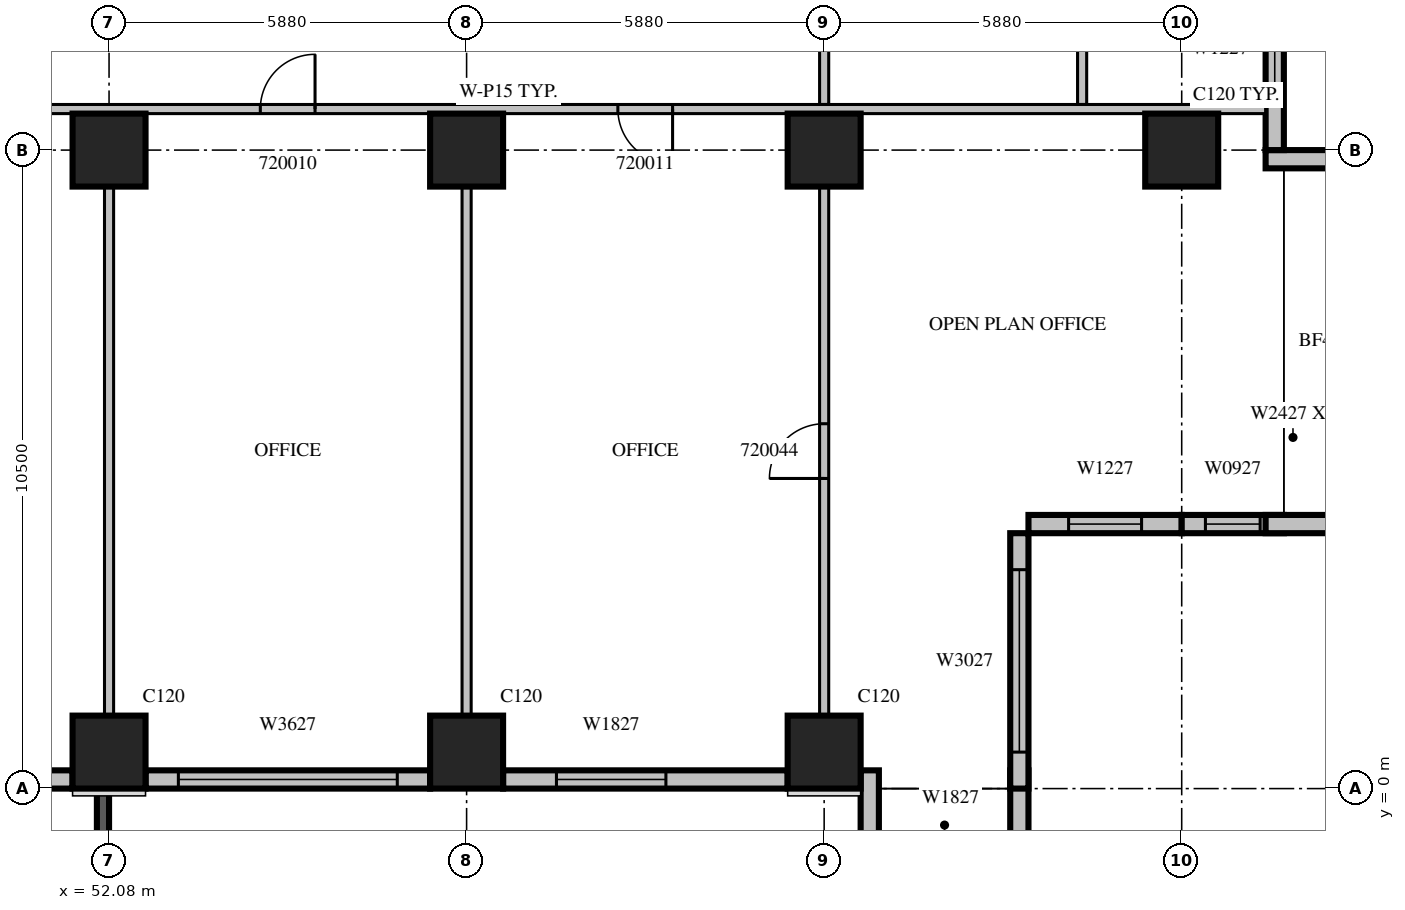
"""IFC4 building model, lengths in metres.
Left out: names, types, materials, properties, quantities, classifications, styles, units other than length and angle.
Written with IfcOpenShell. Run it as: python <this file> out.ifc"""

import sys

from ifc_helpers import new_model, si_unit, direction, frame, frame_2d, origin, origin_2d, place, context, subcontext, project, spatial, rectangle, extrude, source, transform, mapped, element, fill, save


model = new_model("IFC4")
c1 = context("Model", 3, precision=1e-05, world=origin(), true_north=direction((0.0, 1.0)))
c2 = subcontext(c1, "Body", "Model", "MODEL_VIEW")
j1 = project(units=[si_unit("LENGTHUNIT", "METRE"), si_unit("PLANEANGLEUNIT", "RADIAN")], contexts=[c1])
p1 = place(None, origin())
s1 = spatial("IfcSite", under=j1, at=p1, CompositionType="ELEMENT")
p2 = place(p1, origin())
s2 = spatial("IfcBuilding", under=s1, at=p2, CompositionType="ELEMENT")
p3 = place(p2, frame((0.0, 0.0, 95.1)))
s3 = spatial("IfcBuildingStorey", under=s2, at=p3, CompositionType="ELEMENT", Elevation=95.1)
m1 = source(origin(), c2, "Body", "SweptSolid", [
    extrude(rectangle(XDim=1.2, YDim=1.2, at=origin_2d()), origin(), (0.0, 0.0, 1.0), 4.2),
])
for number, where, z_axis, x_axis in (
    (1, (52.08, 0.6, 0.0), (0.0, 0.0, 1.0), (1.0, 0.0, 0.0)),
    (2, (57.96, 0.6, 0.0), (0.0, 0.0, 1.0), (1.0, 0.0, 0.0)),
    (3, (63.84, 0.6, 0.0), (0.0, 0.0, 1.0), (1.0, 0.0, 0.0)),
    (4, (52.08, 10.5, 0.0), (0.0, 0.0, 1.0), (1.0, 0.0, 0.0)),
    (5, (57.96, 10.5, 0.0), (0.0, 0.0, 1.0), (1.0, 0.0, 0.0)),
    (6, (63.84, 10.5, 0.0), (0.0, 0.0, 1.0), (1.0, 0.0, 0.0)),
    (7, (69.72, 10.5, 0.0), (0.0, 0.0, 1.0), (1.0, 0.0, 0.0)),
):
    element("IfcColumn", number, at=place(p3, frame(where, z_axis=z_axis, x_axis=x_axis)), inside=s3, PredefinedType="COLUMN", context=c2, shape_type="MappedRepresentation", body=[
        mapped(m1, transform((0.0, 0.0, 0.0), scale=1.0)),
    ])
m2 = source(origin(), c2, "Body", "SweptSolid", [
    extrude(rectangle(XDim=4.68, YDim=0.3, at=frame_2d((2.34, 0.0))), origin(), (0.0, 0.0, 1.0), 3.8),
])
p4 = place(p3, frame((46.8, 0.15, 0.0), z_axis=(0.0, 0.0, 1.0), x_axis=(1.0, 0.0, 0.0)))
e8 = element("IfcWall", 8, at=p4, inside=s3, PredefinedType="STANDARD", context=c2, shape_type="MappedRepresentation", body=[
    mapped(m2, transform((0.0, 0.0, 0.0), scale=1.0)),
])
m3 = source(origin(), c2, "Body", "SweptSolid", [
    extrude(rectangle(XDim=1.0, YDim=2.1, at=frame_2d((0.5, 1.05))), frame((0.0, 0.16, 0.0), z_axis=(0.0, -1.0, 0.0), x_axis=(1.0, 0.0, 0.0)), (0.0, 0.0, 1.0), 0.32),
])
p5 = place(p4, frame((1.84, 0.0, 0.0)))
e9 = element("IfcOpeningElement", 9, at=p5, cuts=e8, PredefinedType="OPENING", context=c2, shape_type="MappedRepresentation", body=[
    mapped(m3, transform((0.0, 0.0, 0.0), scale=1.0)),
])
p6 = place(p3, frame((52.68, 0.15, 0.0), z_axis=(0.0, 0.0, 1.0), x_axis=(1.0, 0.0, 0.0)))
e10 = element("IfcWall", 10, at=p6, inside=s3, PredefinedType="STANDARD", context=c2, shape_type="MappedRepresentation", body=[
    mapped(m2, transform((0.0, 0.0, 0.0), scale=1.0)),
])
m4 = source(origin(), c2, "Body", "SweptSolid", [
    extrude(rectangle(XDim=3.6, YDim=2.7, at=frame_2d((1.8, 1.35))), frame((0.0, 0.16, 0.0), z_axis=(0.0, -1.0, 0.0), x_axis=(1.0, 0.0, 0.0)), (0.0, 0.0, 1.0), 0.32),
])
p7 = place(p6, frame((0.54, 0.0, 0.6)))
e11 = element("IfcOpeningElement", 11, at=p7, cuts=e10, PredefinedType="OPENING", context=c2, shape_type="MappedRepresentation", body=[
    mapped(m4, transform((0.0, 0.0, 0.0), scale=1.0)),
])
p8 = place(p3, frame((58.56, 0.15, 0.0), z_axis=(0.0, 0.0, 1.0), x_axis=(1.0, 0.0, 0.0)))
e12 = element("IfcWall", 12, at=p8, inside=s3, PredefinedType="STANDARD", context=c2, shape_type="MappedRepresentation", body=[
    mapped(m2, transform((0.0, 0.0, 0.0), scale=1.0)),
])
m5 = source(origin(), c2, "Body", "SweptSolid", [
    extrude(rectangle(XDim=1.8, YDim=2.7, at=frame_2d((0.9, 1.35))), frame((0.0, 0.16, 0.0), z_axis=(0.0, -1.0, 0.0), x_axis=(1.0, 0.0, 0.0)), (0.0, 0.0, 1.0), 0.32),
])
p9 = place(p8, frame((0.877, 0.0, 0.6)))
e13 = element("IfcOpeningElement", 13, at=p9, cuts=e12, PredefinedType="OPENING", context=c2, shape_type="MappedRepresentation", body=[
    mapped(m5, transform((0.0, 0.0, 0.0), scale=1.0)),
])
m6 = source(origin(), c2, "Body", "SweptSolid", [
    extrude(rectangle(XDim=1.2, YDim=0.3, at=frame_2d((0.6, 0.0))), origin(), (0.0, 0.0, 1.0), 3.8),
])
for number, where, z_axis, x_axis in (
    (14, (64.59, 0.3, 0.0), (0.0, 0.0, 1.0), (0.0, -1.0, 0.0)),
    (15, (67.05, 0.3, 0.0), (0.0, 0.0, 1.0), (0.0, -1.0, 0.0)),
):
    element("IfcWall", number, at=place(p3, frame(where, z_axis=z_axis, x_axis=x_axis)), inside=s3, PredefinedType="STANDARD", context=c2, shape_type="MappedRepresentation", body=[
        mapped(m6, transform((0.0, 0.0, 0.0), scale=1.0)),
    ])
m7 = source(origin(), c2, "Body", "SweptSolid", [
    extrude(rectangle(XDim=4.2, YDim=0.3, at=frame_2d((2.1, 0.0))), origin(), (0.0, 0.0, 1.0), 3.8),
])
p10 = place(p3, frame((67.05, 0.0, 0.0), z_axis=(0.0, 0.0, 1.0), x_axis=(0.0, 1.0, 0.0)))
e16 = element("IfcWall", 16, at=p10, inside=s3, PredefinedType="STANDARD", context=c2, shape_type="MappedRepresentation", body=[
    mapped(m7, transform((0.0, 0.0, 0.0), scale=1.0)),
])
m8 = source(origin(), c2, "Body", "SweptSolid", [
    extrude(rectangle(XDim=3.0, YDim=2.7, at=frame_2d((1.5, 1.35))), frame((0.0, 0.16, 0.0), z_axis=(0.0, -1.0, 0.0), x_axis=(1.0, 0.0, 0.0)), (0.0, 0.0, 1.0), 0.32),
])
p11 = place(p10, frame((0.6, 0.0, 0.6)))
e17 = element("IfcOpeningElement", 17, at=p11, cuts=e16, PredefinedType="OPENING", context=c2, shape_type="MappedRepresentation", body=[
    mapped(m8, transform((0.0, 0.0, 0.0), scale=1.0)),
])
m9 = source(origin(), c2, "Body", "SweptSolid", [
    extrude(rectangle(XDim=2.52, YDim=0.3, at=frame_2d((1.26, 0.0))), origin(), (0.0, 0.0, 1.0), 3.8),
])
p12 = place(p3, frame((67.2, 4.35, 0.0), z_axis=(0.0, 0.0, 1.0), x_axis=(1.0, 0.0, 0.0)))
e18 = element("IfcWall", 18, at=p12, inside=s3, PredefinedType="STANDARD", context=c2, shape_type="MappedRepresentation", body=[
    mapped(m9, transform((0.0, 0.0, 0.0), scale=1.0)),
])
m10 = source(origin(), c2, "Body", "SweptSolid", [
    extrude(rectangle(XDim=1.2, YDim=2.7, at=frame_2d((0.6, 1.35))), frame((0.0, 0.16, 0.0), z_axis=(0.0, -1.0, 0.0), x_axis=(1.0, 0.0, 0.0)), (0.0, 0.0, 1.0), 0.32),
])
p13 = place(p12, frame((0.66, 0.0, 0.6)))
e19 = element("IfcOpeningElement", 19, at=p13, cuts=e18, PredefinedType="OPENING", context=c2, shape_type="MappedRepresentation", body=[
    mapped(m10, transform((0.0, 0.0, 0.0), scale=1.0)),
])
m11 = source(origin(), c2, "Body", "SweptSolid", [
    extrude(rectangle(XDim=1.68, YDim=0.3, at=frame_2d((0.84, 0.0))), origin(), (0.0, 0.0, 1.0), 3.8),
])
p14 = place(p3, frame((69.72, 4.35, 0.0), z_axis=(0.0, 0.0, 1.0), x_axis=(1.0, 0.0, 0.0)))
e20 = element("IfcWall", 20, at=p14, inside=s3, PredefinedType="STANDARD", context=c2, shape_type="MappedRepresentation", body=[
    mapped(m11, transform((0.0, 0.0, 0.0), scale=1.0)),
])
m12 = source(origin(), c2, "Body", "SweptSolid", [
    extrude(rectangle(XDim=0.9, YDim=2.7, at=frame_2d((0.45, 1.35))), frame((0.0, 0.16, 0.0), z_axis=(0.0, -1.0, 0.0), x_axis=(1.0, 0.0, 0.0)), (0.0, 0.0, 1.0), 0.32),
])
p15 = place(p14, frame((0.39, 0.0, 0.6)))
e21 = element("IfcOpeningElement", 21, at=p15, cuts=e20, PredefinedType="OPENING", context=c2, shape_type="MappedRepresentation", body=[
    mapped(m12, transform((0.0, 0.0, 0.0), scale=1.0)),
])
for number, where, z_axis, x_axis in (
    (22, (71.1, 4.35, 0.0), (0.0, 0.0, 1.0), (1.0, 0.0, 0.0)),
    (23, (71.1, 10.35, 0.0), (0.0, 0.0, 1.0), (1.0, 0.0, 0.0)),
):
    element("IfcWall", number, at=place(p3, frame(where, z_axis=z_axis, x_axis=x_axis)), inside=s3, PredefinedType="STANDARD", context=c2, shape_type="MappedRepresentation", body=[
        mapped(m6, transform((0.0, 0.0, 0.0), scale=1.0)),
    ])
m13 = source(origin(), c2, "Body", "SweptSolid", [
    extrude(rectangle(XDim=6.3, YDim=0.3, at=frame_2d((3.15, 0.0))), origin(), (0.0, 0.0, 1.0), 3.8),
])
p16 = place(p3, frame((71.25, 10.5, 0.0), z_axis=(0.0, 0.0, 1.0), x_axis=(0.0, 1.0, 0.0)))
e24 = element("IfcWall", 24, at=p16, inside=s3, PredefinedType="STANDARD", context=c2, shape_type="MappedRepresentation", body=[
    mapped(m13, transform((0.0, 0.0, 0.0), scale=1.0)),
])
p17 = place(p16, frame((1.062, 0.0, 0.6)))
e25 = element("IfcOpeningElement", 25, at=p17, cuts=e24, PredefinedType="OPENING", context=c2, shape_type="MappedRepresentation", body=[
    mapped(m10, transform((0.0, 0.0, 0.0), scale=1.0)),
])
m14 = source(origin(), c2, "Body", "SweptSolid", [
    extrude(rectangle(XDim=3.9, YDim=0.2, at=frame_2d((1.95, 0.0))), origin(), (0.0, 0.0, 1.0), 3.79),
])
p18 = place(p3, frame((51.98, 0.0, 0.0), z_axis=(0.0, 0.0, 1.0), x_axis=(0.0, -1.0, 0.0)))
e26 = element("IfcWall", 26, at=p18, inside=s3, PredefinedType="SOLIDWALL", context=c2, shape_type="MappedRepresentation", body=[
    mapped(m14, transform((0.0, 0.0, 0.0), scale=1.0)),
])
m15 = source(origin(), c2, "Body", "SweptSolid", [
    extrude(rectangle(XDim=2.4, YDim=2.7, at=frame_2d((1.2, 1.35))), frame((0.0, 0.11, 0.0), z_axis=(0.0, -1.0, 0.0), x_axis=(1.0, 0.0, 0.0)), (0.0, 0.0, 1.0), 0.22),
])
p19 = place(p18, frame((0.75, 0.0, 0.6)))
e27 = element("IfcOpeningElement", 27, at=p19, cuts=e26, PredefinedType="OPENING", context=c2, shape_type="MappedRepresentation", body=[
    mapped(m15, transform((0.0, 0.0, 0.0), scale=1.0)),
])
m16 = source(origin(), c2, "Body", "SweptSolid", [
    extrude(rectangle(XDim=8.702, YDim=0.15, at=frame_2d((4.351, 0.0))), origin(), (0.0, 0.0, 1.0), 3.8),
])
for number, where, z_axis, x_axis in (
    (28, (52.08, 1.199, 0.0), (0.0, 0.0, 1.0), (0.0, 1.0, 0.0)),
    (29, (57.96, 1.199, 0.0), (0.0, 0.0, 1.0), (0.0, 1.0, 0.0)),
):
    element("IfcWall", number, at=place(p3, frame(where, z_axis=z_axis, x_axis=x_axis)), inside=s3, PredefinedType="PARTITIONING", context=c2, shape_type="MappedRepresentation", body=[
        mapped(m16, transform((0.0, 0.0, 0.0), scale=1.0)),
    ])
m17 = source(origin(), c2, "Body", "SweptSolid", [
    extrude(rectangle(XDim=3.75, YDim=0.15, at=frame_2d((1.875, 0.0))), origin(), (0.0, 0.0, 1.0), 3.8),
])
p20 = place(p3, frame((68.082, 11.25, 0.0), z_axis=(0.0, 0.0, 1.0), x_axis=(0.0, 1.0, 0.0)))
e30 = element("IfcWall", 30, at=p20, inside=s3, PredefinedType="PARTITIONING", context=c2, shape_type="MappedRepresentation", body=[
    mapped(m17, transform((0.0, 0.0, 0.0), scale=1.0)),
])
p21 = place(p3, frame((63.84, 1.199, 0.0), z_axis=(0.0, 0.0, 1.0), x_axis=(0.0, 1.0, 0.0)))
e31 = element("IfcWall", 31, at=p21, inside=s3, PredefinedType="PARTITIONING", context=c2, shape_type="MappedRepresentation", body=[
    mapped(m16, transform((0.0, 0.0, 0.0), scale=1.0)),
])
m18 = source(origin(), c2, "Body", "SweptSolid", [
    extrude(rectangle(XDim=0.9, YDim=2.1, at=frame_2d((0.45, 1.05))), frame((0.0, 0.085, 0.0), z_axis=(0.0, -1.0, 0.0), x_axis=(1.0, 0.0, 0.0)), (0.0, 0.0, 1.0), 0.17),
])
p22 = place(p21, frame((3.901, 0.0, 0.0)))
e32 = element("IfcOpeningElement", 32, at=p22, cuts=e31, PredefinedType="OPENING", context=c2, shape_type="MappedRepresentation", body=[
    mapped(m18, transform((0.0, 0.0, 0.0), scale=1.0)),
])
p23 = place(p3, frame((63.84, 11.25, 0.0), z_axis=(0.0, 0.0, 1.0), x_axis=(0.0, 1.0, 0.0)))
e33 = element("IfcWall", 33, at=p23, inside=s3, PredefinedType="PARTITIONING", context=c2, shape_type="MappedRepresentation", body=[
    mapped(m17, transform((0.0, 0.0, 0.0), scale=1.0)),
])
m19 = source(origin(), c2, "Body", "SweptSolid", [
    extrude(rectangle(XDim=24.9, YDim=0.15, at=frame_2d((12.45, 0.0))), origin(), (0.0, 0.0, 1.0), 3.8),
])
p24 = place(p3, frame((71.1, 11.175, 0.0), z_axis=(0.0, 0.0, 1.0), x_axis=(-1.0, 0.0, 0.0)))
e34 = element("IfcWall", 34, at=p24, inside=s3, PredefinedType="PARTITIONING", context=c2, shape_type="MappedRepresentation", body=[
    mapped(m19, transform((0.0, 0.0, 0.0), scale=1.0)),
])
p25 = place(p24, frame((21.512, 0.0, 0.0)))
e35 = element("IfcOpeningElement", 35, at=p25, cuts=e34, PredefinedType="OPENING", context=c2, shape_type="MappedRepresentation", body=[
    mapped(m18, transform((0.0, 0.0, 0.0), scale=1.0)),
])
p26 = place(p24, frame((15.633, 0.0, 0.0)))
e36 = element("IfcOpeningElement", 36, at=p26, cuts=e34, PredefinedType="OPENING", context=c2, shape_type="MappedRepresentation", body=[
    mapped(m18, transform((0.0, 0.0, 0.0), scale=1.0)),
])
p27 = place(p24, frame((9.752, 0.0, 0.0)))
e37 = element("IfcOpeningElement", 37, at=p27, cuts=e34, PredefinedType="OPENING", context=c2, shape_type="MappedRepresentation", body=[
    mapped(m18, transform((0.0, 0.0, 0.0), scale=1.0)),
])
m20 = source(origin(), c2, "Body", "SweptSolid", [
    extrude(rectangle(XDim=3.6, YDim=2.7, at=frame_2d((1.8, 1.35))), frame((0.0, 0.03, 0.0), z_axis=(0.0, -1.0, 0.0), x_axis=(1.0, 0.0, 0.0)), (0.0, 0.0, 1.0), 0.06),
])
p28 = place(p7, origin())
e38 = element("IfcWindow", 38, at=p28, inside=s3, PartitioningType="SINGLE_PANEL", PredefinedType="WINDOW", context=c2, shape_type="MappedRepresentation", body=[
    mapped(m20, transform((0.0, 0.0, 0.0), scale=1.0)),
])
fill(e11, e38)
m21 = source(origin(), c2, "Body", "SweptSolid", [
    extrude(rectangle(XDim=1.8, YDim=2.7, at=frame_2d((0.9, 1.35))), frame((0.0, 0.03, 0.0), z_axis=(0.0, -1.0, 0.0), x_axis=(1.0, 0.0, 0.0)), (0.0, 0.0, 1.0), 0.06),
])
p29 = place(p9, origin())
e39 = element("IfcWindow", 39, at=p29, inside=s3, PartitioningType="SINGLE_PANEL", PredefinedType="WINDOW", context=c2, shape_type="MappedRepresentation", body=[
    mapped(m21, transform((0.0, 0.0, 0.0), scale=1.0)),
])
fill(e13, e39)
m22 = source(origin(), c2, "Body", "SweptSolid", [
    extrude(rectangle(XDim=3.0, YDim=2.7, at=frame_2d((1.5, 1.35))), frame((0.0, 0.03, 0.0), z_axis=(0.0, -1.0, 0.0), x_axis=(1.0, 0.0, 0.0)), (0.0, 0.0, 1.0), 0.06),
])
p30 = place(p11, origin())
e40 = element("IfcWindow", 40, at=p30, inside=s3, PartitioningType="SINGLE_PANEL", PredefinedType="WINDOW", context=c2, shape_type="MappedRepresentation", body=[
    mapped(m22, transform((0.0, 0.0, 0.0), scale=1.0)),
])
fill(e17, e40)
m23 = source(origin(), c2, "Body", "SweptSolid", [
    extrude(rectangle(XDim=1.2, YDim=2.7, at=frame_2d((0.6, 1.35))), frame((0.0, 0.03, 0.0), z_axis=(0.0, -1.0, 0.0), x_axis=(1.0, 0.0, 0.0)), (0.0, 0.0, 1.0), 0.06),
])
p31 = place(p13, origin())
e41 = element("IfcWindow", 41, at=p31, inside=s3, PartitioningType="SINGLE_PANEL", PredefinedType="WINDOW", context=c2, shape_type="MappedRepresentation", body=[
    mapped(m23, transform((0.0, 0.0, 0.0), scale=1.0)),
])
fill(e19, e41)
m24 = source(origin(), c2, "Body", "SweptSolid", [
    extrude(rectangle(XDim=0.9, YDim=2.7, at=frame_2d((0.45, 1.35))), frame((0.0, 0.03, 0.0), z_axis=(0.0, -1.0, 0.0), x_axis=(1.0, 0.0, 0.0)), (0.0, 0.0, 1.0), 0.06),
])
p32 = place(p15, origin())
e42 = element("IfcWindow", 42, at=p32, inside=s3, PartitioningType="SINGLE_PANEL", PredefinedType="WINDOW", context=c2, shape_type="MappedRepresentation", body=[
    mapped(m24, transform((0.0, 0.0, 0.0), scale=1.0)),
])
fill(e21, e42)
p33 = place(p17, origin())
e43 = element("IfcWindow", 43, at=p33, inside=s3, PartitioningType="SINGLE_PANEL", PredefinedType="WINDOW", context=c2, shape_type="MappedRepresentation", body=[
    mapped(m23, transform((0.0, 0.0, 0.0), scale=1.0)),
])
fill(e25, e43)
m25 = source(origin(), c2, "Body", "SweptSolid", [
    extrude(rectangle(XDim=0.9, YDim=2.1, at=frame_2d((0.45, 1.05))), frame((0.0, 0.025, 0.0), z_axis=(0.0, -1.0, 0.0), x_axis=(1.0, 0.0, 0.0)), (0.0, 0.0, 1.0), 0.05),
])
p34 = place(p26, origin())
e44 = element("IfcDoor", 44, at=p34, inside=s3, OperationType="SINGLE_SWING_RIGHT", PredefinedType="DOOR", context=c2, shape_type="MappedRepresentation", body=[
    mapped(m25, transform((0.0, 0.0, 0.0), scale=1.0)),
])
fill(e36, e44)
p35 = place(p27, origin())
e45 = element("IfcDoor", 45, at=p35, inside=s3, OperationType="SINGLE_SWING_LEFT", PredefinedType="DOOR", context=c2, shape_type="MappedRepresentation", body=[
    mapped(m25, transform((0.0, 0.0, 0.0), scale=1.0)),
])
fill(e37, e45)
p36 = place(p22, origin())
e46 = element("IfcDoor", 46, at=p36, inside=s3, OperationType="SINGLE_SWING_LEFT", PredefinedType="DOOR", context=c2, shape_type="MappedRepresentation", body=[
    mapped(m25, transform((0.0, 0.0, 0.0), scale=1.0)),
])
fill(e32, e46)
save(model, sys.argv[1])
